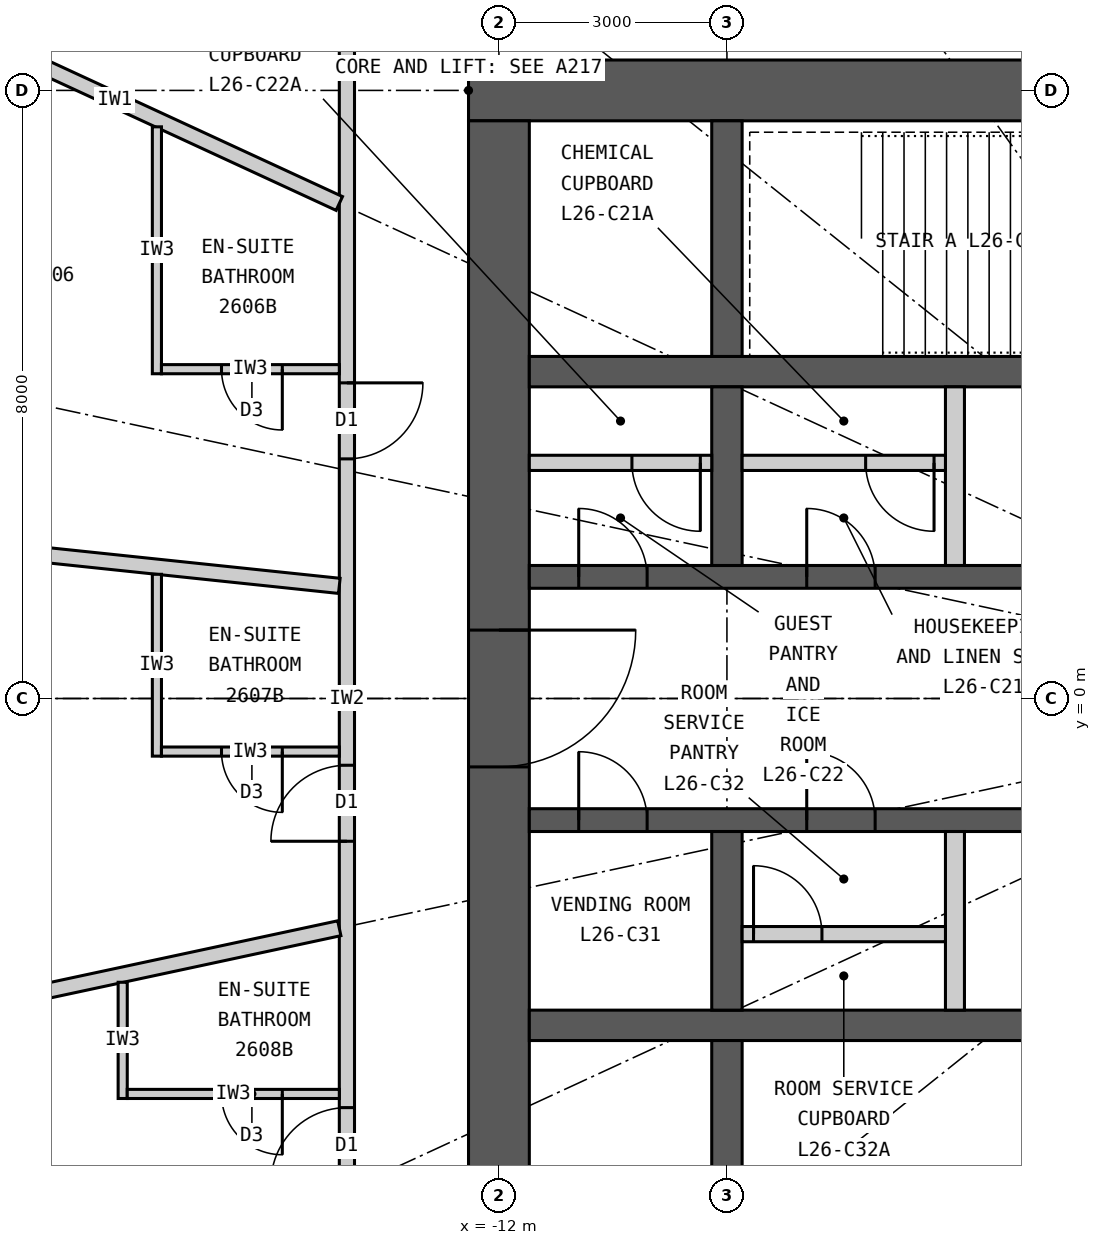
"""IFC4 building model, lengths in metres.
Left out: names, types, materials, properties, quantities, classifications, styles, units other than length and angle.
Written with IfcOpenShell. Run it as: python <this file> out.ifc"""

import sys

from ifc_helpers import new_model, si_unit, direction, frame, frame_2d, origin, place, context, subcontext, project, spatial, rectangle, extrude, element, fill, save


model = new_model("IFC4")
c1 = context("Model", 3, precision=1e-05, world=origin(), true_north=direction((0.0, 1.0)))
c2 = subcontext(c1, "Body", "Model", "MODEL_VIEW")
j1 = project(units=[si_unit("LENGTHUNIT", "METRE"), si_unit("PLANEANGLEUNIT", "RADIAN")], contexts=[c1])
p1 = place(None, origin())
s1 = spatial("IfcSite", under=j1, at=p1, CompositionType="ELEMENT")
p2 = place(p1, origin())
s2 = spatial("IfcBuilding", under=s1, at=p2, CompositionType="ELEMENT")
p3 = place(p2, frame((0.0, 0.0, 105.6)))
s3 = spatial("IfcBuildingStorey", under=s2, at=p3, CompositionType="ELEMENT", Elevation=105.6)
p4 = place(p3, frame((-12.4, 8.0, 0.0), z_axis=(0.0, 0.0, 1.0), x_axis=(1.0, 0.0, 0.0)))
e1 = element("IfcWall", 1, at=p4, inside=s3, PredefinedType="SHEAR", context=c2, shape_type="SweptSolid", body=[
    extrude(rectangle(XDim=24.8, YDim=0.8, at=frame_2d((12.4, 0.0))), origin(), (0.0, 0.0, 1.0), 3.3),
])
p5 = place(p4, frame((11.1, 0.0, 0.0)))
e2 = element("IfcOpeningElement", 2, at=p5, cuts=e1, PredefinedType="OPENING", context=c2, shape_type="SweptSolid", body=[
    extrude(rectangle(XDim=1.2, YDim=2.2, at=frame_2d((0.6, 1.1))), frame((0.0, 0.41, 0.0), z_axis=(0.0, -1.0, 0.0), x_axis=(1.0, 0.0, 0.0)), (0.0, 0.0, 1.0), 0.82),
])
p6 = place(p4, frame((18.7, 0.0, 0.0)))
e3 = element("IfcOpeningElement", 3, at=p6, cuts=e1, PredefinedType="OPENING", context=c2, shape_type="SweptSolid", body=[
    extrude(rectangle(XDim=0.9, YDim=2.2, at=frame_2d((0.45, 1.1))), frame((0.0, 0.41, 0.0), z_axis=(0.0, -1.0, 0.0), x_axis=(1.0, 0.0, 0.0)), (0.0, 0.0, 1.0), 0.82),
])
p7 = place(p3, frame((-12.0, 7.6, 0.0), z_axis=(0.0, 0.0, 1.0), x_axis=(0.0, -1.0, 0.0)))
e4 = element("IfcWall", 4, at=p7, inside=s3, PredefinedType="SHEAR", context=c2, shape_type="SweptSolid", body=[
    extrude(rectangle(XDim=15.2, YDim=0.8, at=frame_2d((7.6, 0.0))), origin(), (0.0, 0.0, 1.0), 3.3),
])
p8 = place(p7, frame((6.7, 0.0, 0.0)))
e5 = element("IfcOpeningElement", 5, at=p8, cuts=e4, PredefinedType="OPENING", context=c2, shape_type="SweptSolid", body=[
    extrude(rectangle(XDim=1.8, YDim=2.2, at=frame_2d((0.9, 1.1))), frame((0.0, 0.41, 0.0), z_axis=(0.0, -1.0, 0.0), x_axis=(1.0, 0.0, 0.0)), (0.0, 0.0, 1.0), 0.82),
])
p9 = place(p3, frame((-11.6, 4.3, 0.0), z_axis=(0.0, 0.0, 1.0), x_axis=(1.0, 0.0, 0.0)))
e6 = element("IfcWall", 6, at=p9, inside=s3, PredefinedType="SHEAR", context=c2, shape_type="SweptSolid", body=[
    extrude(rectangle(XDim=23.2, YDim=0.4, at=frame_2d((11.6, 0.0))), origin(), (0.0, 0.0, 1.0), 3.3),
])
p10 = place(p3, frame((-11.6, 1.6, 0.0), z_axis=(0.0, 0.0, 1.0), x_axis=(1.0, 0.0, 0.0)))
e7 = element("IfcWall", 7, at=p10, inside=s3, PredefinedType="SHEAR", context=c2, shape_type="SweptSolid", body=[
    extrude(rectangle(XDim=23.2, YDim=0.3, at=frame_2d((11.6, 0.0))), origin(), (0.0, 0.0, 1.0), 3.3),
])
p11 = place(p10, frame((6.55, 0.0, 0.0)))
e8 = element("IfcOpeningElement", 8, at=p11, cuts=e7, PredefinedType="OPENING", context=c2, shape_type="SweptSolid", body=[
    extrude(rectangle(XDim=1.1, YDim=2.2, at=frame_2d((0.55, 1.1))), frame((0.0, 0.16, 0.0), z_axis=(0.0, -1.0, 0.0), x_axis=(1.0, 0.0, 0.0)), (0.0, 0.0, 1.0), 0.32),
])
p12 = place(p10, frame((3.65, 0.0, 0.0)))
e9 = element("IfcOpeningElement", 9, at=p12, cuts=e7, PredefinedType="OPENING", context=c2, shape_type="SweptSolid", body=[
    extrude(rectangle(XDim=0.9, YDim=2.2, at=frame_2d((0.45, 1.1))), frame((0.0, 0.16, 0.0), z_axis=(0.0, -1.0, 0.0), x_axis=(1.0, 0.0, 0.0)), (0.0, 0.0, 1.0), 0.32),
])
p13 = place(p10, frame((0.65, 0.0, 0.0)))
e10 = element("IfcOpeningElement", 10, at=p13, cuts=e7, PredefinedType="OPENING", context=c2, shape_type="SweptSolid", body=[
    extrude(rectangle(XDim=0.9, YDim=2.2, at=frame_2d((0.45, 1.1))), frame((0.0, 0.16, 0.0), z_axis=(0.0, -1.0, 0.0), x_axis=(1.0, 0.0, 0.0)), (0.0, 0.0, 1.0), 0.32),
])
p14 = place(p3, frame((-11.6, -4.3, 0.0), z_axis=(0.0, 0.0, 1.0), x_axis=(1.0, 0.0, 0.0)))
e11 = element("IfcWall", 11, at=p14, inside=s3, PredefinedType="SHEAR", context=c2, shape_type="SweptSolid", body=[
    extrude(rectangle(XDim=23.2, YDim=0.4, at=frame_2d((11.6, 0.0))), origin(), (0.0, 0.0, 1.0), 3.3),
])
p15 = place(p3, frame((-11.6, -1.6, 0.0), z_axis=(0.0, 0.0, 1.0), x_axis=(1.0, 0.0, 0.0)))
e12 = element("IfcWall", 12, at=p15, inside=s3, PredefinedType="SHEAR", context=c2, shape_type="SweptSolid", body=[
    extrude(rectangle(XDim=23.2, YDim=0.3, at=frame_2d((11.6, 0.0))), origin(), (0.0, 0.0, 1.0), 3.3),
])
p16 = place(p15, frame((6.55, 0.0, 0.0)))
e13 = element("IfcOpeningElement", 13, at=p16, cuts=e12, PredefinedType="OPENING", context=c2, shape_type="SweptSolid", body=[
    extrude(rectangle(XDim=1.1, YDim=2.2, at=frame_2d((0.55, 1.1))), frame((0.0, 0.16, 0.0), z_axis=(0.0, -1.0, 0.0), x_axis=(1.0, 0.0, 0.0)), (0.0, 0.0, 1.0), 0.32),
])
p17 = place(p15, frame((15.3, 0.0, 0.0)))
e14 = element("IfcOpeningElement", 14, at=p17, cuts=e12, PredefinedType="OPENING", context=c2, shape_type="SweptSolid", body=[
    extrude(rectangle(XDim=1.6, YDim=2.4, at=frame_2d((0.8, 1.2))), frame((0.0, 0.16, 0.0), z_axis=(0.0, -1.0, 0.0), x_axis=(1.0, 0.0, 0.0)), (0.0, 0.0, 1.0), 0.32),
])
p18 = place(p15, frame((0.65, 0.0, 0.0)))
e15 = element("IfcOpeningElement", 15, at=p18, cuts=e12, PredefinedType="OPENING", context=c2, shape_type="SweptSolid", body=[
    extrude(rectangle(XDim=0.9, YDim=2.2, at=frame_2d((0.45, 1.1))), frame((0.0, 0.16, 0.0), z_axis=(0.0, -1.0, 0.0), x_axis=(1.0, 0.0, 0.0)), (0.0, 0.0, 1.0), 0.32),
])
p19 = place(p15, frame((3.65, 0.0, 0.0)))
e16 = element("IfcOpeningElement", 16, at=p19, cuts=e12, PredefinedType="OPENING", context=c2, shape_type="SweptSolid", body=[
    extrude(rectangle(XDim=0.9, YDim=2.2, at=frame_2d((0.45, 1.1))), frame((0.0, 0.16, 0.0), z_axis=(0.0, -1.0, 0.0), x_axis=(1.0, 0.0, 0.0)), (0.0, 0.0, 1.0), 0.32),
])
p20 = place(p3, frame((-9.0, 4.5, 0.0), z_axis=(0.0, 0.0, 1.0), x_axis=(0.0, 1.0, 0.0)))
e17 = element("IfcWall", 17, at=p20, inside=s3, PredefinedType="SHEAR", context=c2, shape_type="SweptSolid", body=[
    extrude(rectangle(XDim=3.1, YDim=0.4, at=frame_2d((1.55, 0.0))), origin(), (0.0, 0.0, 1.0), 3.3),
])
for number, where, z_axis, x_axis in (
    (18, (-9.0, 1.75, 0.0), (0.0, 0.0, 1.0), (0.0, 1.0, 0.0)),
    (19, (-9.0, -4.1, 0.0), (0.0, 0.0, 1.0), (0.0, 1.0, 0.0)),
):
    element("IfcWall", number, at=place(p3, frame(where, z_axis=z_axis, x_axis=x_axis)), inside=s3, PredefinedType="SHEAR", context=c2, shape_type="SweptSolid", body=[
        extrude(rectangle(XDim=2.35, YDim=0.4, at=frame_2d((1.175, 0.0))), origin(), (0.0, 0.0, 1.0), 3.3),
    ])
p21 = place(p3, frame((-9.0, -7.6, 0.0), z_axis=(0.0, 0.0, 1.0), x_axis=(0.0, 1.0, 0.0)))
e20 = element("IfcWall", 20, at=p21, inside=s3, PredefinedType="SHEAR", context=c2, shape_type="SweptSolid", body=[
    extrude(rectangle(XDim=3.1, YDim=0.4, at=frame_2d((1.55, 0.0))), origin(), (0.0, 0.0, 1.0), 3.3),
])
for number, where, z_axis, x_axis in (
    (21, (-6.0, 1.75, 0.0), (0.0, 0.0, 1.0), (0.0, 1.0, 0.0)),
    (22, (-6.0, -4.1, 0.0), (0.0, 0.0, 1.0), (0.0, 1.0, 0.0)),
):
    element("IfcWall", number, at=place(p3, frame(where, z_axis=z_axis, x_axis=x_axis)), inside=s3, PredefinedType="PARTITIONING", context=c2, shape_type="SweptSolid", body=[
        extrude(rectangle(XDim=2.35, YDim=0.25, at=frame_2d((1.175, 0.0))), origin(), (0.0, 0.0, 1.0), 3.3),
    ])
p22 = place(p3, frame((-14.0, 9.9, 0.0), z_axis=(0.0, 0.0, 1.0), x_axis=(0.0, -1.0, 0.0)))
e23 = element("IfcWall", 23, at=p22, inside=s3, PredefinedType="PARTITIONING", context=c2, shape_type="SweptSolid", body=[
    extrude(rectangle(XDim=19.8, YDim=0.2, at=frame_2d((9.9, 0.0))), origin(), (0.0, 0.0, 1.0), 3.12),
])
p23 = place(p22, frame((5.748, 0.0, 0.0)))
e24 = element("IfcOpeningElement", 24, at=p23, cuts=e23, PredefinedType="OPENING", context=c2, shape_type="SweptSolid", body=[
    extrude(rectangle(XDim=1.0, YDim=2.2, at=frame_2d((0.5, 1.1))), frame((0.0, 0.11, 0.0), z_axis=(0.0, -1.0, 0.0), x_axis=(1.0, 0.0, 0.0)), (0.0, 0.0, 1.0), 0.22),
])
p24 = place(p22, frame((10.778, 0.0, 0.0)))
e25 = element("IfcOpeningElement", 25, at=p24, cuts=e23, PredefinedType="OPENING", context=c2, shape_type="SweptSolid", body=[
    extrude(rectangle(XDim=1.0, YDim=2.2, at=frame_2d((0.5, 1.1))), frame((0.0, 0.11, 0.0), z_axis=(0.0, -1.0, 0.0), x_axis=(1.0, 0.0, 0.0)), (0.0, 0.0, 1.0), 0.22),
])
p25 = place(p22, frame((15.282, 0.0, 0.0)))
e26 = element("IfcOpeningElement", 26, at=p25, cuts=e23, PredefinedType="OPENING", context=c2, shape_type="SweptSolid", body=[
    extrude(rectangle(XDim=1.0, YDim=2.2, at=frame_2d((0.5, 1.1))), frame((0.0, 0.11, 0.0), z_axis=(0.0, -1.0, 0.0), x_axis=(1.0, 0.0, 0.0)), (0.0, 0.0, 1.0), 0.22),
])
p26 = place(p3, frame((-14.1, 6.512, 0.0), z_axis=(0.0, 0.0, 1.0), x_axis=(-0.907833019998, 0.419331858797, 0.0)))
e27 = element("IfcWall", 27, at=p26, inside=s3, PredefinedType="PARTITIONING", context=c2, shape_type="SweptSolid", body=[
    extrude(rectangle(XDim=6.505, YDim=0.2, at=frame_2d((3.252, 0.0))), origin(), (0.0, 0.0, 1.0), 2.22),
])
p27 = place(p3, frame((-14.1, 1.482, 0.0), z_axis=(0.0, 0.0, 1.0), x_axis=(-0.994523202615, 0.104516024894, 0.0)))
e28 = element("IfcWall", 28, at=p27, inside=s3, PredefinedType="PARTITIONING", context=c2, shape_type="SweptSolid", body=[
    extrude(rectangle(XDim=10.091, YDim=0.2, at=frame_2d((5.045, 0.0))), origin(), (0.0, 0.0, 1.0), 2.37),
])
p28 = place(p3, frame((-14.1, -3.022, 0.0), z_axis=(0.0, 0.0, 1.0), x_axis=(-0.977783513367, -0.209617272638, 0.0)))
e29 = element("IfcWall", 29, at=p28, inside=s3, PredefinedType="PARTITIONING", context=c2, shape_type="SweptSolid", body=[
    extrude(rectangle(XDim=8.508, YDim=0.2, at=frame_2d((4.254, 0.0))), origin(), (0.0, 0.0, 1.0), 2.27),
])
p29 = place(p3, frame((-16.5, 7.521, 0.0), z_axis=(0.0, 0.0, 1.0), x_axis=(0.0, -1.0, 0.0)))
e30 = element("IfcWall", 30, at=p29, inside=s3, PredefinedType="PARTITIONING", context=c2, shape_type="SweptSolid", body=[
    extrude(rectangle(XDim=3.249, YDim=0.12, at=frame_2d((1.624, 0.0))), origin(), (0.0, 0.0, 1.0), 3.12),
])
p30 = place(p3, frame((-14.1, 4.333, 0.0), z_axis=(0.0, 0.0, 1.0), x_axis=(-1.0, 0.0, 0.0)))
e31 = element("IfcWall", 31, at=p30, inside=s3, PredefinedType="PARTITIONING", context=c2, shape_type="SweptSolid", body=[
    extrude(rectangle(XDim=2.34, YDim=0.12, at=frame_2d((1.17, 0.0))), origin(), (0.0, 0.0, 1.0), 3.12),
])
p31 = place(p30, frame((0.75, 0.0, 0.0)))
e32 = element("IfcOpeningElement", 32, at=p31, cuts=e31, PredefinedType="OPENING", context=c2, shape_type="SweptSolid", body=[
    extrude(rectangle(XDim=0.8, YDim=2.1, at=frame_2d((0.4, 1.05))), frame((0.0, 0.07, 0.0), z_axis=(0.0, -1.0, 0.0), x_axis=(1.0, 0.0, 0.0)), (0.0, 0.0, 1.0), 0.14),
])
p32 = place(p3, frame((-16.5, 1.634, 0.0), z_axis=(0.0, 0.0, 1.0), x_axis=(0.0, -1.0, 0.0)))
e33 = element("IfcWall", 33, at=p32, inside=s3, PredefinedType="PARTITIONING", context=c2, shape_type="SweptSolid", body=[
    extrude(rectangle(XDim=2.392, YDim=0.12, at=frame_2d((1.196, 0.0))), origin(), (0.0, 0.0, 1.0), 3.12),
])
p33 = place(p3, frame((-14.1, -0.698, 0.0), z_axis=(0.0, 0.0, 1.0), x_axis=(-1.0, 0.0, 0.0)))
e34 = element("IfcWall", 34, at=p33, inside=s3, PredefinedType="PARTITIONING", context=c2, shape_type="SweptSolid", body=[
    extrude(rectangle(XDim=2.34, YDim=0.12, at=frame_2d((1.17, 0.0))), origin(), (0.0, 0.0, 1.0), 3.12),
])
p34 = place(p33, frame((0.75, 0.0, 0.0)))
e35 = element("IfcOpeningElement", 35, at=p34, cuts=e34, PredefinedType="OPENING", context=c2, shape_type="SweptSolid", body=[
    extrude(rectangle(XDim=0.8, YDim=2.1, at=frame_2d((0.4, 1.05))), frame((0.0, 0.07, 0.0), z_axis=(0.0, -1.0, 0.0), x_axis=(1.0, 0.0, 0.0)), (0.0, 0.0, 1.0), 0.14),
])
p35 = place(p3, frame((-16.95, -3.733, 0.0), z_axis=(0.0, 0.0, 1.0), x_axis=(0.0, -1.0, 0.0)))
e36 = element("IfcWall", 36, at=p35, inside=s3, PredefinedType="PARTITIONING", context=c2, shape_type="SweptSolid", body=[
    extrude(rectangle(XDim=1.529, YDim=0.12, at=frame_2d((0.765, 0.0))), origin(), (0.0, 0.0, 1.0), 3.12),
])
p36 = place(p3, frame((-14.1, -5.202, 0.0), z_axis=(0.0, 0.0, 1.0), x_axis=(-1.0, 0.0, 0.0)))
e37 = element("IfcWall", 37, at=p36, inside=s3, PredefinedType="PARTITIONING", context=c2, shape_type="SweptSolid", body=[
    extrude(rectangle(XDim=2.79, YDim=0.12, at=frame_2d((1.395, 0.0))), origin(), (0.0, 0.0, 1.0), 3.12),
])
p37 = place(p36, frame((0.75, 0.0, 0.0)))
e38 = element("IfcOpeningElement", 38, at=p37, cuts=e37, PredefinedType="OPENING", context=c2, shape_type="SweptSolid", body=[
    extrude(rectangle(XDim=0.8, YDim=2.1, at=frame_2d((0.4, 1.05))), frame((0.0, 0.07, 0.0), z_axis=(0.0, -1.0, 0.0), x_axis=(1.0, 0.0, 0.0)), (0.0, 0.0, 1.0), 0.14),
])
p38 = place(p3, frame((-8.8, 3.1, 0.0), z_axis=(0.0, 0.0, 1.0), x_axis=(1.0, 0.0, 0.0)))
e39 = element("IfcWall", 39, at=p38, inside=s3, PredefinedType="PARTITIONING", context=c2, shape_type="SweptSolid", body=[
    extrude(rectangle(XDim=2.675, YDim=0.2, at=frame_2d((1.337, 0.0))), origin(), (0.0, 0.0, 1.0), 3.12),
])
p39 = place(p38, frame((1.625, 0.0, 0.0)))
e40 = element("IfcOpeningElement", 40, at=p39, cuts=e39, PredefinedType="OPENING", context=c2, shape_type="SweptSolid", body=[
    extrude(rectangle(XDim=0.9, YDim=2.2, at=frame_2d((0.45, 1.1))), frame((0.0, 0.11, 0.0), z_axis=(0.0, -1.0, 0.0), x_axis=(1.0, 0.0, 0.0)), (0.0, 0.0, 1.0), 0.22),
])
p40 = place(p3, frame((-8.8, -3.1, 0.0), z_axis=(0.0, 0.0, 1.0), x_axis=(1.0, 0.0, 0.0)))
e41 = element("IfcWall", 41, at=p40, inside=s3, PredefinedType="PARTITIONING", context=c2, shape_type="SweptSolid", body=[
    extrude(rectangle(XDim=2.675, YDim=0.2, at=frame_2d((1.337, 0.0))), origin(), (0.0, 0.0, 1.0), 3.12),
])
p41 = place(p40, frame((0.15, 0.0, 0.0)))
e42 = element("IfcOpeningElement", 42, at=p41, cuts=e41, PredefinedType="OPENING", context=c2, shape_type="SweptSolid", body=[
    extrude(rectangle(XDim=0.9, YDim=2.2, at=frame_2d((0.45, 1.1))), frame((0.0, 0.11, 0.0), z_axis=(0.0, -1.0, 0.0), x_axis=(1.0, 0.0, 0.0)), (0.0, 0.0, 1.0), 0.22),
])
p42 = place(p3, frame((-11.6, 3.1, 0.0), z_axis=(0.0, 0.0, 1.0), x_axis=(1.0, 0.0, 0.0)))
e43 = element("IfcWall", 43, at=p42, inside=s3, PredefinedType="PARTITIONING", context=c2, shape_type="SweptSolid", body=[
    extrude(rectangle(XDim=2.4, YDim=0.2, at=frame_2d((1.2, 0.0))), origin(), (0.0, 0.0, 1.0), 3.12),
])
p43 = place(p42, frame((1.35, 0.0, 0.0)))
e44 = element("IfcOpeningElement", 44, at=p43, cuts=e43, PredefinedType="OPENING", context=c2, shape_type="SweptSolid", body=[
    extrude(rectangle(XDim=0.9, YDim=2.2, at=frame_2d((0.45, 1.1))), frame((0.0, 0.11, 0.0), z_axis=(0.0, -1.0, 0.0), x_axis=(1.0, 0.0, 0.0)), (0.0, 0.0, 1.0), 0.22),
])
p44 = place(p31, origin())
e45 = element("IfcDoor", 45, at=p44, inside=s3, OperationType="SINGLE_SWING_LEFT", PredefinedType="DOOR", context=c2, shape_type="SweptSolid", body=[
    extrude(rectangle(XDim=0.8, YDim=2.1, at=frame_2d((0.4, 1.05))), frame((0.0, 0.025, 0.0), z_axis=(0.0, -1.0, 0.0), x_axis=(1.0, 0.0, 0.0)), (0.0, 0.0, 1.0), 0.05),
])
fill(e32, e45)
p45 = place(p23, origin())
e46 = element("IfcDoor", 46, at=p45, inside=s3, OperationType="SINGLE_SWING_LEFT", PredefinedType="DOOR", context=c2, shape_type="SweptSolid", body=[
    extrude(rectangle(XDim=1.0, YDim=2.2, at=frame_2d((0.5, 1.1))), frame((0.0, 0.025, 0.0), z_axis=(0.0, -1.0, 0.0), x_axis=(1.0, 0.0, 0.0)), (0.0, 0.0, 1.0), 0.05),
])
fill(e24, e46)
p46 = place(p34, origin())
e47 = element("IfcDoor", 47, at=p46, inside=s3, OperationType="SINGLE_SWING_LEFT", PredefinedType="DOOR", context=c2, shape_type="SweptSolid", body=[
    extrude(rectangle(XDim=0.8, YDim=2.1, at=frame_2d((0.4, 1.05))), frame((0.0, 0.025, 0.0), z_axis=(0.0, -1.0, 0.0), x_axis=(1.0, 0.0, 0.0)), (0.0, 0.0, 1.0), 0.05),
])
fill(e35, e47)
p47 = place(p24, origin())
e48 = element("IfcDoor", 48, at=p47, inside=s3, OperationType="SINGLE_SWING_RIGHT", PredefinedType="DOOR", context=c2, shape_type="SweptSolid", body=[
    extrude(rectangle(XDim=1.0, YDim=2.2, at=frame_2d((0.5, 1.1))), frame((0.0, 0.025, 0.0), z_axis=(0.0, -1.0, 0.0), x_axis=(1.0, 0.0, 0.0)), (0.0, 0.0, 1.0), 0.05),
])
fill(e25, e48)
p48 = place(p37, origin())
e49 = element("IfcDoor", 49, at=p48, inside=s3, OperationType="SINGLE_SWING_LEFT", PredefinedType="DOOR", context=c2, shape_type="SweptSolid", body=[
    extrude(rectangle(XDim=0.8, YDim=2.1, at=frame_2d((0.4, 1.05))), frame((0.0, 0.025, 0.0), z_axis=(0.0, -1.0, 0.0), x_axis=(1.0, 0.0, 0.0)), (0.0, 0.0, 1.0), 0.05),
])
fill(e38, e49)
p49 = place(p25, origin())
e50 = element("IfcDoor", 50, at=p49, inside=s3, OperationType="SINGLE_SWING_RIGHT", PredefinedType="DOOR", context=c2, shape_type="SweptSolid", body=[
    extrude(rectangle(XDim=1.0, YDim=2.2, at=frame_2d((0.5, 1.1))), frame((0.0, 0.025, 0.0), z_axis=(0.0, -1.0, 0.0), x_axis=(1.0, 0.0, 0.0)), (0.0, 0.0, 1.0), 0.05),
])
fill(e26, e50)
p50 = place(p39, origin())
e51 = element("IfcDoor", 51, at=p50, inside=s3, OperationType="SINGLE_SWING_RIGHT", PredefinedType="DOOR", context=c2, shape_type="SweptSolid", body=[
    extrude(rectangle(XDim=0.9, YDim=2.2, at=frame_2d((0.45, 1.1))), frame((0.0, 0.025, 0.0), z_axis=(0.0, -1.0, 0.0), x_axis=(1.0, 0.0, 0.0)), (0.0, 0.0, 1.0), 0.05),
])
fill(e40, e51)
p51 = place(p12, origin())
e52 = element("IfcDoor", 52, at=p51, inside=s3, OperationType="SINGLE_SWING_LEFT", PredefinedType="DOOR", context=c2, shape_type="SweptSolid", body=[
    extrude(rectangle(XDim=0.9, YDim=2.2, at=frame_2d((0.45, 1.1))), frame((0.0, 0.025, 0.0), z_axis=(0.0, -1.0, 0.0), x_axis=(1.0, 0.0, 0.0)), (0.0, 0.0, 1.0), 0.05),
])
fill(e9, e52)
p52 = place(p18, origin())
e53 = element("IfcDoor", 53, at=p52, inside=s3, OperationType="SINGLE_SWING_LEFT", PredefinedType="DOOR", context=c2, shape_type="SweptSolid", body=[
    extrude(rectangle(XDim=0.9, YDim=2.2, at=frame_2d((0.45, 1.1))), frame((0.0, 0.025, 0.0), z_axis=(0.0, -1.0, 0.0), x_axis=(1.0, 0.0, 0.0)), (0.0, 0.0, 1.0), 0.05),
])
fill(e15, e53)
p53 = place(p41, origin())
e54 = element("IfcDoor", 54, at=p53, inside=s3, OperationType="SINGLE_SWING_LEFT", PredefinedType="DOOR", context=c2, shape_type="SweptSolid", body=[
    extrude(rectangle(XDim=0.9, YDim=2.2, at=frame_2d((0.45, 1.1))), frame((0.0, 0.025, 0.0), z_axis=(0.0, -1.0, 0.0), x_axis=(1.0, 0.0, 0.0)), (0.0, 0.0, 1.0), 0.05),
])
fill(e42, e54)
p54 = place(p19, origin())
e55 = element("IfcDoor", 55, at=p54, inside=s3, OperationType="SINGLE_SWING_LEFT", PredefinedType="DOOR", context=c2, shape_type="SweptSolid", body=[
    extrude(rectangle(XDim=0.9, YDim=2.2, at=frame_2d((0.45, 1.1))), frame((0.0, 0.025, 0.0), z_axis=(0.0, -1.0, 0.0), x_axis=(1.0, 0.0, 0.0)), (0.0, 0.0, 1.0), 0.05),
])
fill(e16, e55)
p55 = place(p13, origin())
e56 = element("IfcDoor", 56, at=p55, inside=s3, OperationType="SINGLE_SWING_LEFT", PredefinedType="DOOR", context=c2, shape_type="SweptSolid", body=[
    extrude(rectangle(XDim=0.9, YDim=2.2, at=frame_2d((0.45, 1.1))), frame((0.0, 0.025, 0.0), z_axis=(0.0, -1.0, 0.0), x_axis=(1.0, 0.0, 0.0)), (0.0, 0.0, 1.0), 0.05),
])
fill(e10, e56)
p56 = place(p43, origin())
e57 = element("IfcDoor", 57, at=p56, inside=s3, OperationType="SINGLE_SWING_RIGHT", PredefinedType="DOOR", context=c2, shape_type="SweptSolid", body=[
    extrude(rectangle(XDim=0.9, YDim=2.2, at=frame_2d((0.45, 1.1))), frame((0.0, 0.025, 0.0), z_axis=(0.0, -1.0, 0.0), x_axis=(1.0, 0.0, 0.0)), (0.0, 0.0, 1.0), 0.05),
])
fill(e44, e57)
p57 = place(p8, origin())
e58 = element("IfcDoor", 58, at=p57, inside=s3, OperationType="DOUBLE_DOOR_DOUBLE_SWING", PredefinedType="DOOR", context=c2, shape_type="SweptSolid", body=[
    extrude(rectangle(XDim=1.8, YDim=2.2, at=frame_2d((0.9, 1.1))), frame((0.0, 0.025, 0.0), z_axis=(0.0, -1.0, 0.0), x_axis=(1.0, 0.0, 0.0)), (0.0, 0.0, 1.0), 0.05),
])
fill(e5, e58)
save(model, sys.argv[1])
